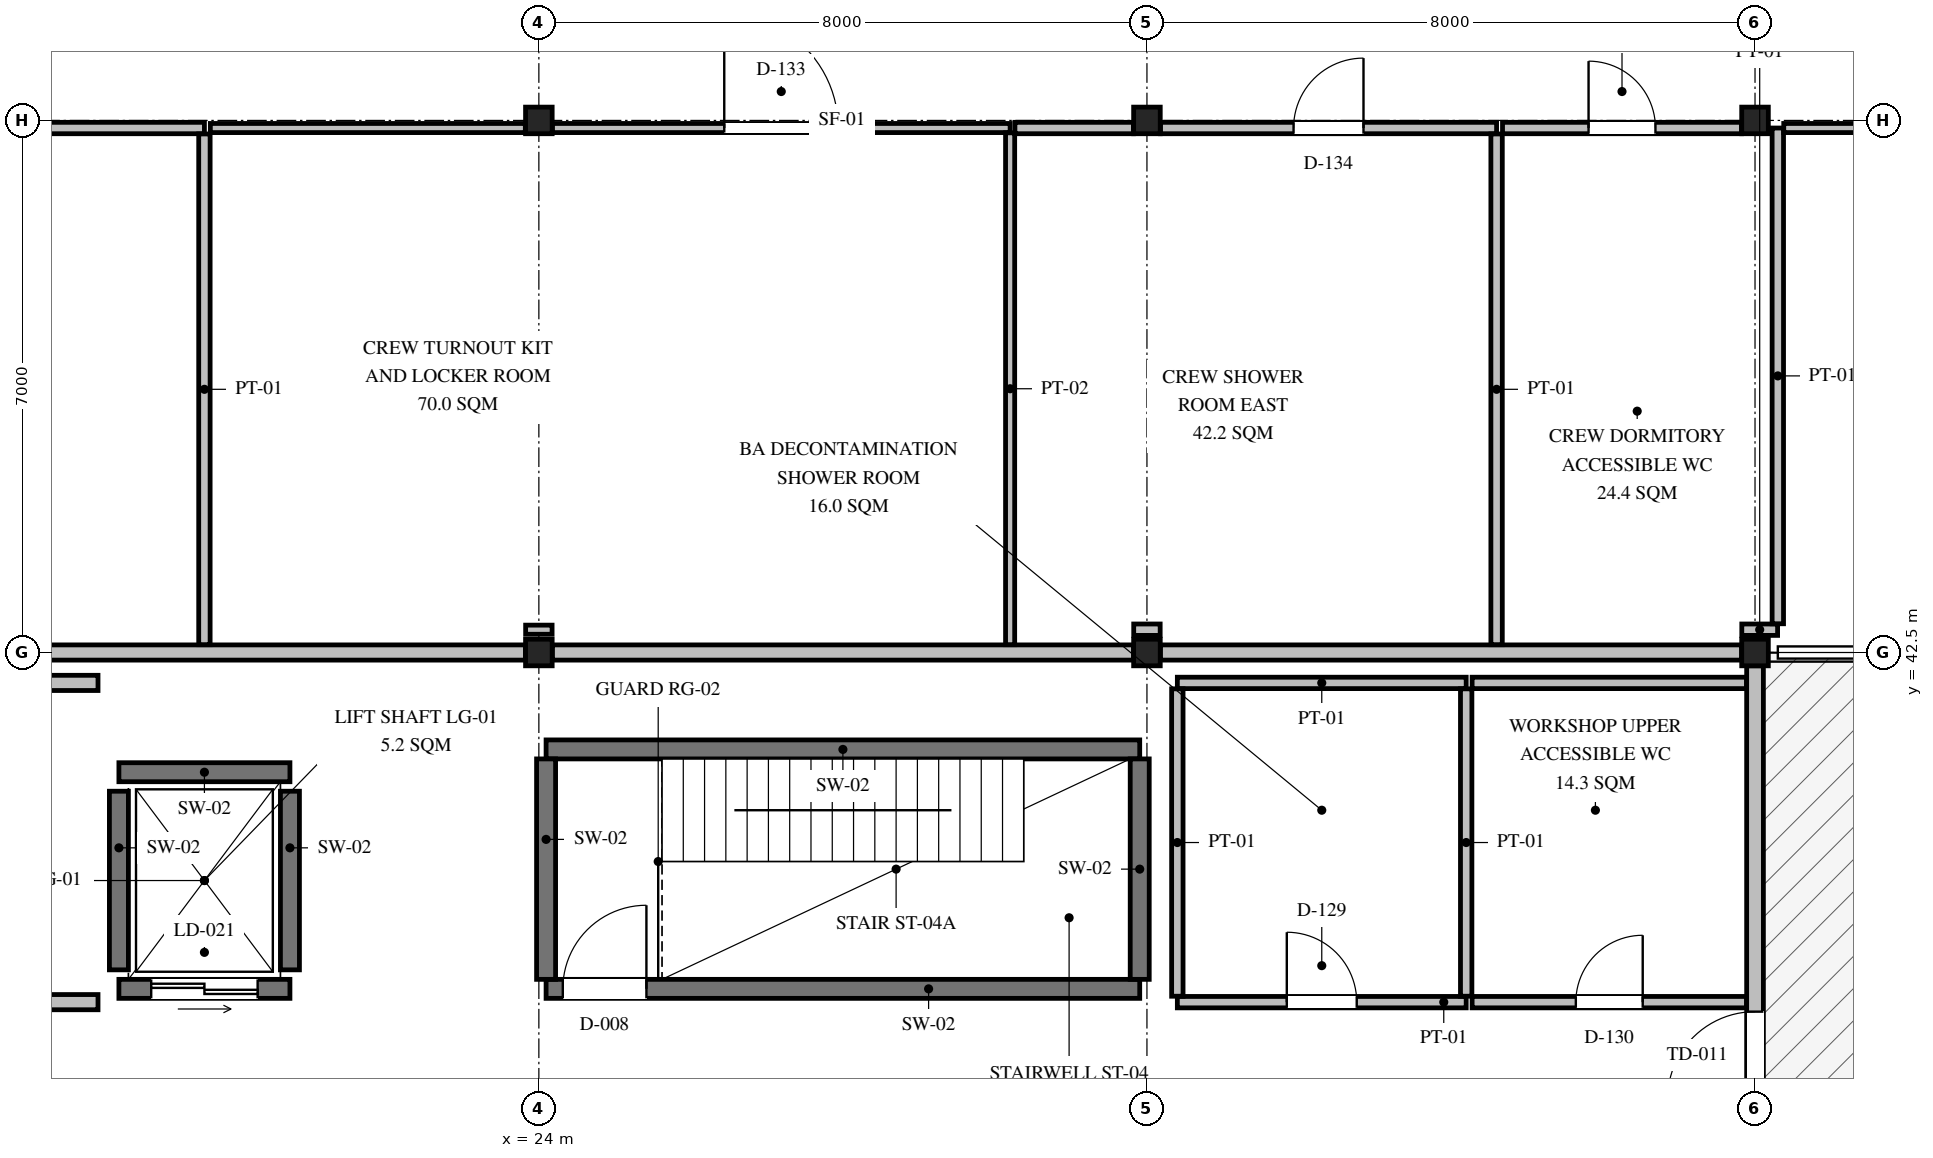
"""IFC4 building model, lengths in metres.
Left out: names, types, materials, properties, quantities, classifications, styles, units other than length and angle.
Written with IfcOpenShell. Run it as: python <this file> out.ifc"""

import sys

from ifc_helpers import new_model, si_unit, direction, frame, frame_2d, origin, origin_2d, place, context, subcontext, project, spatial, rectangle, i_section, extrude, element, fill, save


model = new_model("IFC4")
c1 = context("Model", 3, precision=1e-05, world=origin(), true_north=direction((0.0, 1.0)))
c2 = subcontext(c1, "Body", "Model", "MODEL_VIEW")
j1 = project(units=[si_unit("LENGTHUNIT", "METRE"), si_unit("PLANEANGLEUNIT", "RADIAN")], contexts=[c1])
p1 = place(None, origin())
s1 = spatial("IfcSite", under=j1, at=p1, CompositionType="ELEMENT")
p2 = place(p1, origin())
s2 = spatial("IfcBuilding", under=s1, at=p2, CompositionType="ELEMENT")
p3 = place(p2, frame((0.0, 0.0, 5.85)))
s3 = spatial("IfcBuildingStorey", under=s2, at=p3, CompositionType="ELEMENT", Elevation=5.85)
for number, where, z_axis, x_axis in (
    (1, (24.0, 42.5, 0.0), (0.0, 0.0, 1.0), (1.0, 0.0, 0.0)),
    (2, (24.0, 49.5, 0.0), (0.0, 0.0, 1.0), (1.0, 0.0, 0.0)),
    (3, (32.0, 42.5, 0.0), (0.0, 0.0, 1.0), (1.0, 0.0, 0.0)),
    (4, (32.0, 49.5, 0.0), (0.0, 0.0, 1.0), (1.0, 0.0, 0.0)),
    (5, (40.0, 42.5, 0.0), (0.0, 0.0, 1.0), (1.0, 0.0, 0.0)),
    (6, (40.0, 49.5, 0.0), (0.0, 0.0, 1.0), (1.0, 0.0, 0.0)),
):
    element("IfcColumn", number, at=place(p3, frame(where, z_axis=z_axis, x_axis=x_axis)), inside=s3, PredefinedType="COLUMN", context=c2, shape_type="SweptSolid", body=[
        extrude(i_section(OverallWidth=0.35, OverallDepth=0.35, WebThickness=0.012, FlangeThickness=0.019, FilletRadius=0.02, at=origin_2d()), origin(), (0.0, 0.0, 1.0), 4.2),
    ])
p4 = place(p3, frame((40.0, 22.625, 0.0), z_axis=(0.0, 0.0, 1.0), x_axis=(0.0, 1.0, 0.0)))
e7 = element("IfcWall", 7, at=p4, inside=s3, PredefinedType="SOLIDWALL", context=c2, shape_type="SweptSolid", body=[
    extrude(rectangle(XDim=19.7, YDim=0.22, at=frame_2d((9.85, 0.0))), origin(), (0.0, 0.0, 1.0), 3.294),
])
p5 = place(p4, frame((14.0, 0.0, 0.0)))
e8 = element("IfcOpeningElement", 8, at=p5, cuts=e7, PredefinedType="OPENING", context=c2, shape_type="SweptSolid", body=[
    extrude(rectangle(XDim=1.15, YDim=2.2, at=frame_2d((0.575, 1.1))), frame((0.0, 0.12, 0.0), z_axis=(0.0, -1.0, 0.0), x_axis=(1.0, 0.0, 0.0)), (0.0, 0.0, 1.0), 0.24),
])
p6 = place(p4, frame((3.0, 0.0, 1.0)))
e9 = element("IfcOpeningElement", 9, at=p6, cuts=e7, PredefinedType="OPENING", context=c2, shape_type="SweptSolid", body=[
    extrude(rectangle(XDim=1.75, YDim=1.3, at=frame_2d((0.875, 0.65))), frame((0.0, 0.12, 0.0), z_axis=(0.0, -1.0, 0.0), x_axis=(1.0, 0.0, 0.0)), (0.0, 0.0, 1.0), 0.24),
])
p7 = place(p3, frame((24.095, 38.075, 0.0), z_axis=(0.0, 0.0, 1.0), x_axis=(1.0, 0.0, 0.0)))
e10 = element("IfcWall", 10, at=p7, inside=s3, PredefinedType="SHEAR", context=c2, shape_type="SweptSolid", body=[
    extrude(rectangle(XDim=7.81, YDim=0.25, at=frame_2d((3.905, 0.0))), origin(), (0.0, 0.0, 1.0), 4.0),
])
p8 = place(p7, frame((0.22, 0.0, 0.0)))
e11 = element("IfcOpeningElement", 11, at=p8, cuts=e10, PredefinedType="OPENING", context=c2, shape_type="SweptSolid", body=[
    extrude(rectangle(XDim=1.1, YDim=2.15, at=frame_2d((0.55, 1.075))), frame((0.0, 0.135, 0.0), z_axis=(0.0, -1.0, 0.0), x_axis=(1.0, 0.0, 0.0)), (0.0, 0.0, 1.0), 0.27),
])
p9 = place(p3, frame((24.095, 41.225, 0.0), z_axis=(0.0, 0.0, 1.0), x_axis=(1.0, 0.0, 0.0)))
e12 = element("IfcWall", 12, at=p9, inside=s3, PredefinedType="SHEAR", context=c2, shape_type="SweptSolid", body=[
    extrude(rectangle(XDim=7.81, YDim=0.25, at=frame_2d((3.905, 0.0))), origin(), (0.0, 0.0, 1.0), 4.0),
])
for number, where, z_axis, x_axis in (
    (13, (24.095, 38.2, 0.0), (0.0, 0.0, 1.0), (0.0, 1.0, 0.0)),
    (14, (31.905, 38.2, 0.0), (0.0, 0.0, 1.0), (0.0, 1.0, 0.0)),
):
    element("IfcWall", number, at=place(p3, frame(where, z_axis=z_axis, x_axis=x_axis)), inside=s3, PredefinedType="SHEAR", context=c2, shape_type="SweptSolid", body=[
        extrude(rectangle(XDim=2.9, YDim=0.25, at=frame_2d((1.45, 0.0))), origin(), (0.0, 0.0, 1.0), 4.0),
    ])
p10 = place(p3, frame((18.475, 38.075, 0.0), z_axis=(0.0, 0.0, 1.0), x_axis=(1.0, 0.0, 0.0)))
e15 = element("IfcWall", 15, at=p10, inside=s3, PredefinedType="SHEAR", context=c2, shape_type="SweptSolid", body=[
    extrude(rectangle(XDim=2.25, YDim=0.25, at=frame_2d((1.125, 0.0))), origin(), (0.0, 0.0, 1.0), 4.0),
])
p11 = place(p10, frame((0.425, 0.0, 0.0)))
e16 = element("IfcOpeningElement", 16, at=p11, cuts=e15, PredefinedType="OPENING", context=c2, shape_type="SweptSolid", body=[
    extrude(rectangle(XDim=1.4, YDim=2.2, at=frame_2d((0.7, 1.1))), frame((0.0, 0.135, 0.0), z_axis=(0.0, -1.0, 0.0), x_axis=(1.0, 0.0, 0.0)), (0.0, 0.0, 1.0), 0.27),
])
p12 = place(p3, frame((18.475, 40.925, 0.0), z_axis=(0.0, 0.0, 1.0), x_axis=(1.0, 0.0, 0.0)))
e17 = element("IfcWall", 17, at=p12, inside=s3, PredefinedType="SHEAR", context=c2, shape_type="SweptSolid", body=[
    extrude(rectangle(XDim=2.25, YDim=0.25, at=frame_2d((1.125, 0.0))), origin(), (0.0, 0.0, 1.0), 4.0),
])
for number, where, z_axis, x_axis in (
    (18, (18.475, 38.325, 0.0), (0.0, 0.0, 1.0), (0.0, 1.0, 0.0)),
    (19, (20.725, 38.325, 0.0), (0.0, 0.0, 1.0), (0.0, 1.0, 0.0)),
):
    element("IfcWall", number, at=place(p3, frame(where, z_axis=z_axis, x_axis=x_axis)), inside=s3, PredefinedType="SHEAR", context=c2, shape_type="SweptSolid", body=[
        extrude(rectangle(XDim=2.35, YDim=0.25, at=frame_2d((1.175, 0.0))), origin(), (0.0, 0.0, 1.0), 4.0),
    ])
p13 = place(p3, frame((16.177, 42.5, 0.0), z_axis=(0.0, 0.0, 1.0), x_axis=(1.0, 0.0, 0.0)))
e20 = element("IfcWall", 20, at=p13, inside=s3, PredefinedType="PARTITIONING", context=c2, shape_type="SweptSolid", body=[
    extrude(rectangle(XDim=7.646, YDim=0.2, at=frame_2d((3.823, 0.0))), origin(), (0.0, 0.0, 1.0), 3.494),
])
p14 = place(p3, frame((24.177, 42.5, 0.0), z_axis=(0.0, 0.0, 1.0), x_axis=(1.0, 0.0, 0.0)))
e21 = element("IfcWall", 21, at=p14, inside=s3, PredefinedType="PARTITIONING", context=c2, shape_type="SweptSolid", body=[
    extrude(rectangle(XDim=7.646, YDim=0.2, at=frame_2d((3.823, 0.0))), origin(), (0.0, 0.0, 1.0), 3.594),
])
p15 = place(p3, frame((32.177, 42.5, 0.0), z_axis=(0.0, 0.0, 1.0), x_axis=(1.0, 0.0, 0.0)))
e22 = element("IfcWall", 22, at=p15, inside=s3, PredefinedType="PARTITIONING", context=c2, shape_type="SweptSolid", body=[
    extrude(rectangle(XDim=7.646, YDim=0.2, at=frame_2d((3.823, 0.0))), origin(), (0.0, 0.0, 1.0), 3.604),
])
p16 = place(p3, frame((0.153, 37.9, 0.0), z_axis=(0.0, 0.0, 1.0), x_axis=(1.0, 0.0, 0.0)))
e23 = element("IfcWall", 23, at=p16, inside=s3, PredefinedType="PARTITIONING", context=c2, shape_type="SweptSolid", body=[
    extrude(rectangle(XDim=18.047, YDim=0.2, at=frame_2d((9.023, 0.0))), origin(), (0.0, 0.0, 1.0), 4.0),
])
p17 = place(p16, frame((8.523, 0.0, 0.0)))
e24 = element("IfcOpeningElement", 24, at=p17, cuts=e23, PredefinedType="OPENING", context=c2, shape_type="SweptSolid", body=[
    extrude(rectangle(XDim=1.0, YDim=2.1, at=frame_2d((0.5, 1.05))), frame((0.0, 0.11, 0.0), z_axis=(0.0, -1.0, 0.0), x_axis=(1.0, 0.0, 0.0)), (0.0, 0.0, 1.0), 0.22),
])
p18 = place(p3, frame((0.153, 42.1, 0.0), z_axis=(0.0, 0.0, 1.0), x_axis=(1.0, 0.0, 0.0)))
e25 = element("IfcWall", 25, at=p18, inside=s3, PredefinedType="PARTITIONING", context=c2, shape_type="SweptSolid", body=[
    extrude(rectangle(XDim=18.047, YDim=0.2, at=frame_2d((9.023, 0.0))), origin(), (0.0, 0.0, 1.0), 4.0),
])
p19 = place(p3, frame((32.4, 37.9, 0.0), z_axis=(0.0, 0.0, 1.0), x_axis=(1.0, 0.0, 0.0)))
e26 = element("IfcWall", 26, at=p19, inside=s3, PredefinedType="PARTITIONING", context=c2, shape_type="SweptSolid", body=[
    extrude(rectangle(XDim=3.8, YDim=0.15, at=frame_2d((1.9, 0.0))), origin(), (0.0, 0.0, 1.0), 4.0),
])
p20 = place(p19, frame((1.44, 0.0, 0.0)))
e27 = element("IfcOpeningElement", 27, at=p20, cuts=e26, PredefinedType="OPENING", context=c2, shape_type="SweptSolid", body=[
    extrude(rectangle(XDim=0.92, YDim=2.1, at=frame_2d((0.46, 1.05))), frame((0.0, 0.085, 0.0), z_axis=(0.0, -1.0, 0.0), x_axis=(1.0, 0.0, 0.0)), (0.0, 0.0, 1.0), 0.17),
])
p21 = place(p3, frame((32.4, 42.1, 0.0), z_axis=(0.0, 0.0, 1.0), x_axis=(1.0, 0.0, 0.0)))
e28 = element("IfcWall", 28, at=p21, inside=s3, PredefinedType="PARTITIONING", context=c2, shape_type="SweptSolid", body=[
    extrude(rectangle(XDim=3.8, YDim=0.15, at=frame_2d((1.9, 0.0))), origin(), (0.0, 0.0, 1.0), 4.0),
])
p22 = place(p3, frame((32.4, 37.978, 0.0), z_axis=(0.0, 0.0, 1.0), x_axis=(0.0, 1.0, 0.0)))
e29 = element("IfcWall", 29, at=p22, inside=s3, PredefinedType="PARTITIONING", context=c2, shape_type="SweptSolid", body=[
    extrude(rectangle(XDim=4.044, YDim=0.15, at=frame_2d((2.022, 0.0))), origin(), (0.0, 0.0, 1.0), 4.0),
])
p23 = place(p3, frame((36.2, 37.978, 0.0), z_axis=(0.0, 0.0, 1.0), x_axis=(0.0, 1.0, 0.0)))
e30 = element("IfcWall", 30, at=p23, inside=s3, PredefinedType="PARTITIONING", context=c2, shape_type="SweptSolid", body=[
    extrude(rectangle(XDim=4.044, YDim=0.15, at=frame_2d((2.022, 0.0))), origin(), (0.0, 0.0, 1.0), 3.7),
])
p24 = place(p3, frame((36.278, 37.9, 0.0), z_axis=(0.0, 0.0, 1.0), x_axis=(1.0, 0.0, 0.0)))
e31 = element("IfcWall", 31, at=p24, inside=s3, PredefinedType="PARTITIONING", context=c2, shape_type="SweptSolid", body=[
    extrude(rectangle(XDim=3.609, YDim=0.15, at=frame_2d((1.804, 0.0))), origin(), (0.0, 0.0, 1.0), 4.0),
])
p25 = place(p24, frame((1.365, 0.0, 0.0)))
e32 = element("IfcOpeningElement", 32, at=p25, cuts=e31, PredefinedType="OPENING", context=c2, shape_type="SweptSolid", body=[
    extrude(rectangle(XDim=0.88, YDim=2.1, at=frame_2d((0.44, 1.05))), frame((0.0, 0.085, 0.0), z_axis=(0.0, -1.0, 0.0), x_axis=(1.0, 0.0, 0.0)), (0.0, 0.0, 1.0), 0.17),
])
p26 = place(p3, frame((36.278, 42.1, 0.0), z_axis=(0.0, 0.0, 1.0), x_axis=(1.0, 0.0, 0.0)))
e33 = element("IfcWall", 33, at=p26, inside=s3, PredefinedType="PARTITIONING", context=c2, shape_type="SweptSolid", body=[
    extrude(rectangle(XDim=3.609, YDim=0.15, at=frame_2d((1.804, 0.0))), origin(), (0.0, 0.0, 1.0), 4.0),
])
p27 = place(p3, frame((16.178, 49.4, 0.0), z_axis=(0.0, 0.0, 1.0), x_axis=(1.0, 0.0, 0.0)))
e34 = element("IfcWall", 34, at=p27, inside=s3, PredefinedType="PARTITIONING", context=c2, shape_type="SweptSolid", body=[
    extrude(rectangle(XDim=3.422, YDim=0.15, at=frame_2d((1.711, 0.0))), origin(), (0.0, 0.0, 1.0), 3.444),
])
p28 = place(p3, frame((19.6, 42.603, 0.0), z_axis=(0.0, 0.0, 1.0), x_axis=(0.0, 1.0, 0.0)))
e35 = element("IfcWall", 35, at=p28, inside=s3, PredefinedType="PARTITIONING", context=c2, shape_type="SweptSolid", body=[
    extrude(rectangle(XDim=6.719, YDim=0.15, at=frame_2d((3.359, 0.0))), origin(), (0.0, 0.0, 1.0), 4.0),
])
p29 = place(p3, frame((23.826, 42.8, 0.0), z_axis=(0.0, 0.0, 1.0), x_axis=(1.0, 0.0, 0.0)))
e36 = element("IfcWall", 36, at=p29, inside=s3, PredefinedType="PARTITIONING", context=c2, shape_type="SweptSolid", body=[
    extrude(rectangle(XDim=0.348, YDim=0.12, at=frame_2d((0.174, 0.0))), origin(), (0.0, 0.0, 1.0), 4.0),
])
p30 = place(p3, frame((19.678, 49.4, 0.0), z_axis=(0.0, 0.0, 1.0), x_axis=(1.0, 0.0, 0.0)))
e37 = element("IfcWall", 37, at=p30, inside=s3, PredefinedType="PARTITIONING", context=c2, shape_type="SweptSolid", body=[
    extrude(rectangle(XDim=4.144, YDim=0.12, at=frame_2d((2.072, 0.0))), origin(), (0.0, 0.0, 1.0), 3.444),
])
p31 = place(p3, frame((24.178, 49.4, 0.0), z_axis=(0.0, 0.0, 1.0), x_axis=(1.0, 0.0, 0.0)))
e38 = element("IfcWall", 38, at=p31, inside=s3, PredefinedType="PARTITIONING", context=c2, shape_type="SweptSolid", body=[
    extrude(rectangle(XDim=6.022, YDim=0.12, at=frame_2d((3.011, 0.0))), origin(), (0.0, 0.0, 1.0), 3.494),
])
p32 = place(p31, frame((2.261, 0.0, 0.0)))
e39 = element("IfcOpeningElement", 39, at=p32, cuts=e38, PredefinedType="OPENING", context=c2, shape_type="SweptSolid", body=[
    extrude(rectangle(XDim=1.5, YDim=2.25, at=frame_2d((0.75, 1.125))), frame((0.0, 0.07, 0.0), z_axis=(0.0, -1.0, 0.0), x_axis=(1.0, 0.0, 0.0)), (0.0, 0.0, 1.0), 0.14),
])
p33 = place(p3, frame((30.2, 42.603, 0.0), z_axis=(0.0, 0.0, 1.0), x_axis=(0.0, 1.0, 0.0)))
e40 = element("IfcWall", 40, at=p33, inside=s3, PredefinedType="PARTITIONING", context=c2, shape_type="SweptSolid", body=[
    extrude(rectangle(XDim=6.734, YDim=0.12, at=frame_2d((3.367, 0.0))), origin(), (0.0, 0.0, 1.0), 4.0),
])
p34 = place(p3, frame((31.826, 42.8, 0.0), z_axis=(0.0, 0.0, 1.0), x_axis=(1.0, 0.0, 0.0)))
e41 = element("IfcWall", 41, at=p34, inside=s3, PredefinedType="PARTITIONING", context=c2, shape_type="SweptSolid", body=[
    extrude(rectangle(XDim=0.348, YDim=0.15, at=frame_2d((0.174, 0.0))), origin(), (0.0, 0.0, 1.0), 4.0),
])
p35 = place(p3, frame((30.263, 49.4, 0.0), z_axis=(0.0, 0.0, 1.0), x_axis=(1.0, 0.0, 0.0)))
e42 = element("IfcWall", 42, at=p35, inside=s3, PredefinedType="PARTITIONING", context=c2, shape_type="SweptSolid", body=[
    extrude(rectangle(XDim=1.559, YDim=0.15, at=frame_2d((0.78, 0.0))), origin(), (0.0, 0.0, 1.0), 3.494),
])
p36 = place(p3, frame((32.178, 49.4, 0.0), z_axis=(0.0, 0.0, 1.0), x_axis=(1.0, 0.0, 0.0)))
e43 = element("IfcWall", 43, at=p36, inside=s3, PredefinedType="PARTITIONING", context=c2, shape_type="SweptSolid", body=[
    extrude(rectangle(XDim=4.422, YDim=0.15, at=frame_2d((2.211, 0.0))), origin(), (0.0, 0.0, 1.0), 3.544),
])
p37 = place(p36, frame((1.751, 0.0, 0.0)))
e44 = element("IfcOpeningElement", 44, at=p37, cuts=e43, PredefinedType="OPENING", context=c2, shape_type="SweptSolid", body=[
    extrude(rectangle(XDim=0.92, YDim=2.1, at=frame_2d((0.46, 1.05))), frame((0.0, 0.085, 0.0), z_axis=(0.0, -1.0, 0.0), x_axis=(1.0, 0.0, 0.0)), (0.0, 0.0, 1.0), 0.17),
])
p38 = place(p3, frame((36.6, 42.603, 0.0), z_axis=(0.0, 0.0, 1.0), x_axis=(0.0, 1.0, 0.0)))
e45 = element("IfcWall", 45, at=p38, inside=s3, PredefinedType="PARTITIONING", context=c2, shape_type="SweptSolid", body=[
    extrude(rectangle(XDim=6.719, YDim=0.15, at=frame_2d((3.359, 0.0))), origin(), (0.0, 0.0, 1.0), 4.0),
])
p39 = place(p3, frame((39.826, 42.8, 0.0), z_axis=(0.0, 0.0, 1.0), x_axis=(1.0, 0.0, 0.0)))
e46 = element("IfcWall", 46, at=p39, inside=s3, PredefinedType="PARTITIONING", context=c2, shape_type="SweptSolid", body=[
    extrude(rectangle(XDim=0.471, YDim=0.15, at=frame_2d((0.236, 0.0))), origin(), (0.0, 0.0, 1.0), 4.0),
])
p40 = place(p3, frame((36.678, 49.4, 0.0), z_axis=(0.0, 0.0, 1.0), x_axis=(1.0, 0.0, 0.0)))
e47 = element("IfcWall", 47, at=p40, inside=s3, PredefinedType="PARTITIONING", context=c2, shape_type="SweptSolid", body=[
    extrude(rectangle(XDim=3.144, YDim=0.15, at=frame_2d((1.572, 0.0))), origin(), (0.0, 0.0, 1.0), 3.544),
])
p41 = place(p40, frame((1.132, 0.0, 0.0)))
e48 = element("IfcOpeningElement", 48, at=p41, cuts=e47, PredefinedType="OPENING", context=c2, shape_type="SweptSolid", body=[
    extrude(rectangle(XDim=0.88, YDim=2.1, at=frame_2d((0.44, 1.05))), frame((0.0, 0.085, 0.0), z_axis=(0.0, -1.0, 0.0), x_axis=(1.0, 0.0, 0.0)), (0.0, 0.0, 1.0), 0.17),
])
p42 = place(p3, frame((40.3, 42.878, 0.0), z_axis=(0.0, 0.0, 1.0), x_axis=(0.0, 1.0, 0.0)))
e49 = element("IfcWall", 49, at=p42, inside=s3, PredefinedType="PARTITIONING", context=c2, shape_type="SweptSolid", body=[
    extrude(rectangle(XDim=6.522, YDim=0.15, at=frame_2d((3.261, 0.0))), origin(), (0.0, 0.0, 1.0), 4.0),
])
p43 = place(p3, frame((40.378, 49.4, 0.0), z_axis=(0.0, 0.0, 1.0), x_axis=(1.0, 0.0, 0.0)))
e50 = element("IfcWall", 50, at=p43, inside=s3, PredefinedType="PARTITIONING", context=c2, shape_type="SweptSolid", body=[
    extrude(rectangle(XDim=7.444, YDim=0.12, at=frame_2d((3.722, 0.0))), origin(), (0.0, 0.0, 1.0), 3.494),
])
p44 = place(p43, frame((3.197, 0.0, 0.0)))
e51 = element("IfcOpeningElement", 51, at=p44, cuts=e50, PredefinedType="OPENING", context=c2, shape_type="SweptSolid", body=[
    extrude(rectangle(XDim=1.05, YDim=2.1, at=frame_2d((0.525, 1.05))), frame((0.0, 0.07, 0.0), z_axis=(0.0, -1.0, 0.0), x_axis=(1.0, 0.0, 0.0)), (0.0, 0.0, 1.0), 0.14),
])
p45 = place(p5, frame((1.15, 0.0, 0.0), z_axis=(0.0, 0.0, 1.0), x_axis=(-1.0, 0.0, 0.0)))
e52 = element("IfcDoor", 52, at=p45, inside=s3, OperationType="SINGLE_SWING_LEFT", PredefinedType="DOOR", context=c2, shape_type="SweptSolid", body=[
    extrude(rectangle(XDim=1.15, YDim=2.2, at=frame_2d((0.575, 1.1))), frame((0.0, 0.025, 0.0), z_axis=(0.0, -1.0, 0.0), x_axis=(1.0, 0.0, 0.0)), (0.0, 0.0, 1.0), 0.05),
])
fill(e8, e52)
p46 = place(p8, frame((1.1, 0.0, 0.0), z_axis=(0.0, 0.0, 1.0), x_axis=(-1.0, 0.0, 0.0)))
e53 = element("IfcDoor", 53, at=p46, inside=s3, OperationType="SINGLE_SWING_RIGHT", PredefinedType="DOOR", context=c2, shape_type="SweptSolid", body=[
    extrude(rectangle(XDim=1.1, YDim=2.15, at=frame_2d((0.55, 1.075))), frame((0.0, 0.025, 0.0), z_axis=(0.0, -1.0, 0.0), x_axis=(1.0, 0.0, 0.0)), (0.0, 0.0, 1.0), 0.05),
])
fill(e11, e53)
p47 = place(p11, origin())
e54 = element("IfcDoor", 54, at=p47, inside=s3, OperationType="DOUBLE_DOOR_SLIDING", PredefinedType="DOOR", context=c2, shape_type="SweptSolid", body=[
    extrude(rectangle(XDim=1.4, YDim=2.2, at=frame_2d((0.7, 1.1))), frame((0.0, 0.025, 0.0), z_axis=(0.0, -1.0, 0.0), x_axis=(1.0, 0.0, 0.0)), (0.0, 0.0, 1.0), 0.05),
])
fill(e16, e54)
p48 = place(p20, origin())
e55 = element("IfcDoor", 55, at=p48, inside=s3, OperationType="SINGLE_SWING_LEFT", PredefinedType="DOOR", context=c2, shape_type="SweptSolid", body=[
    extrude(rectangle(XDim=0.92, YDim=2.1, at=frame_2d((0.46, 1.05))), frame((0.0, 0.025, 0.0), z_axis=(0.0, -1.0, 0.0), x_axis=(1.0, 0.0, 0.0)), (0.0, 0.0, 1.0), 0.05),
])
fill(e27, e55)
p49 = place(p25, origin())
e56 = element("IfcDoor", 56, at=p49, inside=s3, OperationType="SINGLE_SWING_RIGHT", PredefinedType="DOOR", context=c2, shape_type="SweptSolid", body=[
    extrude(rectangle(XDim=0.88, YDim=2.1, at=frame_2d((0.44, 1.05))), frame((0.0, 0.025, 0.0), z_axis=(0.0, -1.0, 0.0), x_axis=(1.0, 0.0, 0.0)), (0.0, 0.0, 1.0), 0.05),
])
fill(e32, e56)
p50 = place(p32, origin())
e57 = element("IfcDoor", 57, at=p50, inside=s3, OperationType="SINGLE_SWING_LEFT", PredefinedType="DOOR", context=c2, shape_type="SweptSolid", body=[
    extrude(rectangle(XDim=1.5, YDim=2.25, at=frame_2d((0.75, 1.125))), frame((0.0, 0.025, 0.0), z_axis=(0.0, -1.0, 0.0), x_axis=(1.0, 0.0, 0.0)), (0.0, 0.0, 1.0), 0.05),
])
fill(e39, e57)
p51 = place(p37, origin())
e58 = element("IfcDoor", 58, at=p51, inside=s3, OperationType="SINGLE_SWING_RIGHT", PredefinedType="DOOR", context=c2, shape_type="SweptSolid", body=[
    extrude(rectangle(XDim=0.92, YDim=2.1, at=frame_2d((0.46, 1.05))), frame((0.0, 0.025, 0.0), z_axis=(0.0, -1.0, 0.0), x_axis=(1.0, 0.0, 0.0)), (0.0, 0.0, 1.0), 0.05),
])
fill(e44, e58)
p52 = place(p41, origin())
e59 = element("IfcDoor", 59, at=p52, inside=s3, OperationType="SINGLE_SWING_LEFT", PredefinedType="DOOR", context=c2, shape_type="SweptSolid", body=[
    extrude(rectangle(XDim=0.88, YDim=2.1, at=frame_2d((0.44, 1.05))), frame((0.0, 0.025, 0.0), z_axis=(0.0, -1.0, 0.0), x_axis=(1.0, 0.0, 0.0)), (0.0, 0.0, 1.0), 0.05),
])
fill(e48, e59)
save(model, sys.argv[1])
